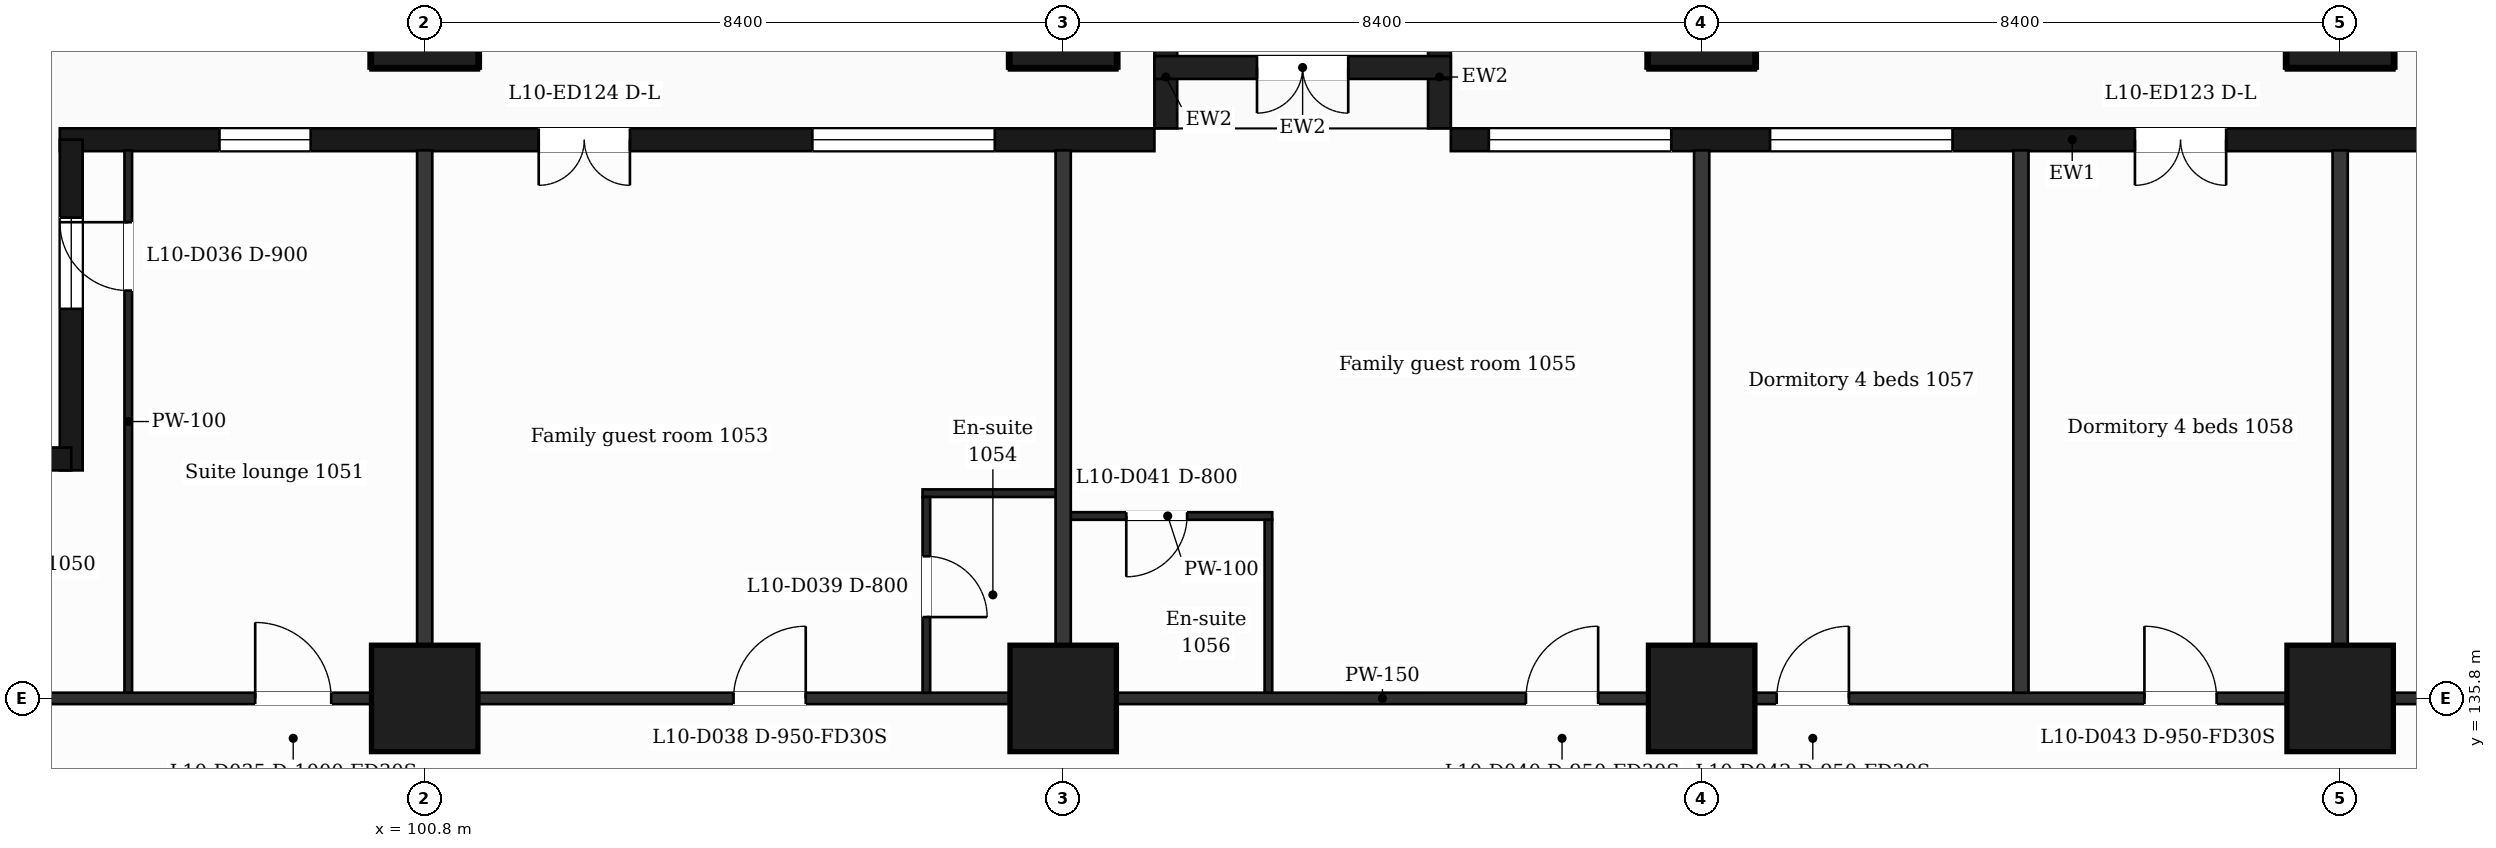
"""IFC4 building model, lengths in metres.
Left out: names, types, materials, properties, quantities, classifications, styles, units other than length and angle.
Written with IfcOpenShell. Run it as: python <this file> out.ifc"""

import sys

from ifc_helpers import new_model, si_unit, direction, frame, frame_2d, origin, origin_2d, place, context, subcontext, project, spatial, rectangle, extrude, element, fill, save


model = new_model("IFC4")
c1 = context("Model", 3, precision=1e-05, world=origin(), true_north=direction((0.0, 1.0)))
c2 = subcontext(c1, "Body", "Model", "MODEL_VIEW")
j1 = project(units=[si_unit("LENGTHUNIT", "METRE"), si_unit("PLANEANGLEUNIT", "RADIAN")], contexts=[c1])
p1 = place(None, origin())
s1 = spatial("IfcSite", under=j1, at=p1, CompositionType="ELEMENT")
p2 = place(p1, origin())
s2 = spatial("IfcBuilding", under=s1, at=p2, CompositionType="ELEMENT")
p3 = place(p2, frame((0.0, 0.0, 53.0)))
s3 = spatial("IfcBuildingStorey", under=s2, at=p3, CompositionType="ELEMENT", Elevation=53.0)
for number, where, z_axis, x_axis in (
    (1, (100.8, 135.8, 0.0), (0.0, 0.0, 1.0), (1.0, 0.0, 0.0)),
    (2, (109.2, 135.8, 0.0), (0.0, 0.0, 1.0), (1.0, 0.0, 0.0)),
    (3, (117.6, 135.8, 0.0), (0.0, 0.0, 1.0), (1.0, 0.0, 0.0)),
    (4, (126.0, 135.8, 0.0), (0.0, 0.0, 1.0), (1.0, 0.0, 0.0)),
    (5, (100.8, 144.8, 0.0), (0.0, 0.0, 1.0), (1.0, 0.0, 0.0)),
    (6, (109.2, 144.8, 0.0), (0.0, 0.0, 1.0), (1.0, 0.0, 0.0)),
    (7, (117.6, 144.8, 0.0), (0.0, 0.0, 1.0), (1.0, 0.0, 0.0)),
    (8, (126.0, 144.8, 0.0), (0.0, 0.0, 1.0), (1.0, 0.0, 0.0)),
):
    element("IfcColumn", number, at=place(p3, frame(where, z_axis=z_axis, x_axis=x_axis)), inside=s3, PredefinedType="COLUMN", context=c2, shape_type="SweptSolid", body=[
        extrude(rectangle(XDim=1.4, YDim=1.4, at=origin_2d()), origin(), (0.0, 0.0, 1.0), 3.5),
    ])
p4 = place(p3, frame((130.65, 143.15, 0.0), z_axis=(0.0, 0.0, 1.0), x_axis=(-1.0, 0.0, 0.0)))
e9 = element("IfcWall", 9, at=p4, inside=s3, PredefinedType="SOLIDWALL", context=c2, shape_type="SweptSolid", body=[
    extrude(rectangle(XDim=16.35, YDim=0.3, at=frame_2d((8.175, 0.0))), origin(), (0.0, 0.0, 1.0), 3.18),
])
p5 = place(p4, frame((1.95, 0.0, 0.9)))
e10 = element("IfcOpeningElement", 10, at=p5, cuts=e9, PredefinedType="OPENING", context=c2, shape_type="SweptSolid", body=[
    extrude(rectangle(XDim=1.2, YDim=2.1, at=frame_2d((0.6, 1.05))), frame((0.0, 0.16, 0.0), z_axis=(0.0, -1.0, 0.0), x_axis=(1.0, 0.0, 0.0)), (0.0, 0.0, 1.0), 0.32),
])
p6 = place(p4, frame((6.15, 0.0, 0.0)))
e11 = element("IfcOpeningElement", 11, at=p6, cuts=e9, PredefinedType="OPENING", context=c2, shape_type="SweptSolid", body=[
    extrude(rectangle(XDim=1.2, YDim=2.4, at=frame_2d((0.6, 1.2))), frame((0.0, 0.16, 0.0), z_axis=(0.0, -1.0, 0.0), x_axis=(1.0, 0.0, 0.0)), (0.0, 0.0, 1.0), 0.32),
])
p7 = place(p4, frame((9.75, 0.0, 0.9)))
e12 = element("IfcOpeningElement", 12, at=p7, cuts=e9, PredefinedType="OPENING", context=c2, shape_type="SweptSolid", body=[
    extrude(rectangle(XDim=2.4, YDim=2.1, at=frame_2d((1.2, 1.05))), frame((0.0, 0.16, 0.0), z_axis=(0.0, -1.0, 0.0), x_axis=(1.0, 0.0, 0.0)), (0.0, 0.0, 1.0), 0.32),
])
p8 = place(p4, frame((13.45, 0.0, 0.9)))
e13 = element("IfcOpeningElement", 13, at=p8, cuts=e9, PredefinedType="OPENING", context=c2, shape_type="SweptSolid", body=[
    extrude(rectangle(XDim=2.4, YDim=2.1, at=frame_2d((1.2, 1.05))), frame((0.0, 0.16, 0.0), z_axis=(0.0, -1.0, 0.0), x_axis=(1.0, 0.0, 0.0)), (0.0, 0.0, 1.0), 0.32),
])
p9 = place(p3, frame((110.4, 143.15, 0.0), z_axis=(0.0, 0.0, 1.0), x_axis=(-1.0, 0.0, 0.0)))
e14 = element("IfcWall", 14, at=p9, inside=s3, PredefinedType="SOLIDWALL", context=c2, shape_type="SweptSolid", body=[
    extrude(rectangle(XDim=14.4, YDim=0.3, at=frame_2d((7.2, 0.0))), origin(), (0.0, 0.0, 1.0), 3.18),
])
p10 = place(p9, frame((2.1, 0.0, 0.9)))
e15 = element("IfcOpeningElement", 15, at=p10, cuts=e14, PredefinedType="OPENING", context=c2, shape_type="SweptSolid", body=[
    extrude(rectangle(XDim=2.4, YDim=2.1, at=frame_2d((1.2, 1.05))), frame((0.0, 0.16, 0.0), z_axis=(0.0, -1.0, 0.0), x_axis=(1.0, 0.0, 0.0)), (0.0, 0.0, 1.0), 0.32),
])
p11 = place(p9, frame((6.9, 0.0, 0.0)))
e16 = element("IfcOpeningElement", 16, at=p11, cuts=e14, PredefinedType="OPENING", context=c2, shape_type="SweptSolid", body=[
    extrude(rectangle(XDim=1.2, YDim=2.4, at=frame_2d((0.6, 1.2))), frame((0.0, 0.16, 0.0), z_axis=(0.0, -1.0, 0.0), x_axis=(1.0, 0.0, 0.0)), (0.0, 0.0, 1.0), 0.32),
])
p12 = place(p9, frame((11.1, 0.0, 0.9)))
e17 = element("IfcOpeningElement", 17, at=p12, cuts=e14, PredefinedType="OPENING", context=c2, shape_type="SweptSolid", body=[
    extrude(rectangle(XDim=1.2, YDim=2.1, at=frame_2d((0.6, 1.05))), frame((0.0, 0.16, 0.0), z_axis=(0.0, -1.0, 0.0), x_axis=(1.0, 0.0, 0.0)), (0.0, 0.0, 1.0), 0.32),
])
for number, where, z_axis, x_axis in (
    (18, (114.15, 143.3, 0.0), (0.0, 0.0, 1.0), (0.0, 1.0, 0.0)),
    (19, (110.55, 143.3, 0.0), (0.0, 0.0, 1.0), (0.0, 1.0, 0.0)),
):
    element("IfcWall", number, at=place(p3, frame(where, z_axis=z_axis, x_axis=x_axis)), inside=s3, PredefinedType="SOLIDWALL", context=c2, shape_type="SweptSolid", body=[
        extrude(rectangle(XDim=1.35, YDim=0.3, at=frame_2d((0.675, 0.0))), origin(), (0.0, 0.0, 1.0), 3.18),
    ])
p13 = place(p3, frame((114.3, 144.1, 0.0), z_axis=(0.0, 0.0, 1.0), x_axis=(-1.0, 0.0, 0.0)))
e20 = element("IfcWall", 20, at=p13, inside=s3, PredefinedType="SOLIDWALL", context=c2, shape_type="SweptSolid", body=[
    extrude(rectangle(XDim=3.9, YDim=0.3, at=frame_2d((1.95, 0.0))), origin(), (0.0, 0.0, 1.0), 3.18),
])
p14 = place(p13, frame((1.35, 0.0, 0.0)))
e21 = element("IfcOpeningElement", 21, at=p14, cuts=e20, PredefinedType="OPENING", context=c2, shape_type="SweptSolid", body=[
    extrude(rectangle(XDim=1.2, YDim=2.4, at=frame_2d((0.6, 1.2))), frame((0.0, 0.16, 0.0), z_axis=(0.0, -1.0, 0.0), x_axis=(1.0, 0.0, 0.0)), (0.0, 0.0, 1.0), 0.32),
])
p15 = place(p3, frame((96.15, 143.15, 0.0), z_axis=(0.0, 0.0, 1.0), x_axis=(0.0, -1.0, 0.0)))
e22 = element("IfcWall", 22, at=p15, inside=s3, PredefinedType="SOLIDWALL", context=c2, shape_type="SweptSolid", body=[
    extrude(rectangle(XDim=4.35, YDim=0.3, at=frame_2d((2.175, 0.0))), origin(), (0.0, 0.0, 1.0), 3.18),
])
p16 = place(p15, frame((1.025, 0.0, 0.9)))
e23 = element("IfcOpeningElement", 23, at=p16, cuts=e22, PredefinedType="OPENING", context=c2, shape_type="SweptSolid", body=[
    extrude(rectangle(XDim=1.2, YDim=2.1, at=frame_2d((0.6, 1.05))), frame((0.0, 0.16, 0.0), z_axis=(0.0, -1.0, 0.0), x_axis=(1.0, 0.0, 0.0)), (0.0, 0.0, 1.0), 0.32),
])
p17 = place(p3, frame((96.15, 138.95, 0.0), z_axis=(0.0, 0.0, 1.0), x_axis=(-1.0, 0.0, 0.0)))
e24 = element("IfcWall", 24, at=p17, inside=s3, PredefinedType="SOLIDWALL", context=c2, shape_type="SweptSolid", body=[
    extrude(rectangle(XDim=5.104, YDim=0.3, at=frame_2d((2.552, 0.0))), origin(), (0.0, 0.0, 1.0), 3.18),
])
p18 = place(p17, frame((0.725, 0.0, 0.9)))
e25 = element("IfcOpeningElement", 25, at=p18, cuts=e24, PredefinedType="OPENING", context=c2, shape_type="SweptSolid", body=[
    extrude(rectangle(XDim=2.4, YDim=2.1, at=frame_2d((1.2, 1.05))), frame((0.0, 0.16, 0.0), z_axis=(0.0, -1.0, 0.0), x_axis=(1.0, 0.0, 0.0)), (0.0, 0.0, 1.0), 0.32),
])
p19 = place(p3, frame((90.895, 135.8, 0.0), z_axis=(0.0, 0.0, 1.0), x_axis=(1.0, 0.0, 0.0)))
e26 = element("IfcWall", 26, at=p19, inside=s3, PredefinedType="PARTITIONING", context=c2, shape_type="SweptSolid", body=[
    extrude(rectangle(XDim=45.011, YDim=0.15, at=frame_2d((22.505, 0.0))), origin(), (0.0, 0.0, 1.0), 3.18),
])
p20 = place(p19, frame((7.675, 0.0, 0.0)))
e27 = element("IfcOpeningElement", 27, at=p20, cuts=e26, PredefinedType="OPENING", context=c2, shape_type="SweptSolid", body=[
    extrude(rectangle(XDim=1.0, YDim=2.1, at=frame_2d((0.5, 1.05))), frame((0.0, 0.085, 0.0), z_axis=(0.0, -1.0, 0.0), x_axis=(1.0, 0.0, 0.0)), (0.0, 0.0, 1.0), 0.17),
])
p21 = place(p19, frame((13.969, 0.0, 0.0)))
e28 = element("IfcOpeningElement", 28, at=p21, cuts=e26, PredefinedType="OPENING", context=c2, shape_type="SweptSolid", body=[
    extrude(rectangle(XDim=0.95, YDim=2.1, at=frame_2d((0.475, 1.05))), frame((0.0, 0.085, 0.0), z_axis=(0.0, -1.0, 0.0), x_axis=(1.0, 0.0, 0.0)), (0.0, 0.0, 1.0), 0.17),
])
p22 = place(p19, frame((24.393, 0.0, 0.0)))
e29 = element("IfcOpeningElement", 29, at=p22, cuts=e26, PredefinedType="OPENING", context=c2, shape_type="SweptSolid", body=[
    extrude(rectangle(XDim=0.95, YDim=2.1, at=frame_2d((0.475, 1.05))), frame((0.0, 0.085, 0.0), z_axis=(0.0, -1.0, 0.0), x_axis=(1.0, 0.0, 0.0)), (0.0, 0.0, 1.0), 0.17),
])
p23 = place(p19, frame((27.692, 0.0, 0.0)))
e30 = element("IfcOpeningElement", 30, at=p23, cuts=e26, PredefinedType="OPENING", context=c2, shape_type="SweptSolid", body=[
    extrude(rectangle(XDim=0.95, YDim=2.1, at=frame_2d((0.475, 1.05))), frame((0.0, 0.085, 0.0), z_axis=(0.0, -1.0, 0.0), x_axis=(1.0, 0.0, 0.0)), (0.0, 0.0, 1.0), 0.17),
])
p24 = place(p19, frame((32.531, 0.0, 0.0)))
e31 = element("IfcOpeningElement", 31, at=p24, cuts=e26, PredefinedType="OPENING", context=c2, shape_type="SweptSolid", body=[
    extrude(rectangle(XDim=0.95, YDim=2.1, at=frame_2d((0.475, 1.05))), frame((0.0, 0.085, 0.0), z_axis=(0.0, -1.0, 0.0), x_axis=(1.0, 0.0, 0.0)), (0.0, 0.0, 1.0), 0.17),
])
p25 = place(p19, frame((39.814, 0.0, 0.0)))
e32 = element("IfcOpeningElement", 32, at=p25, cuts=e26, PredefinedType="OPENING", context=c2, shape_type="SweptSolid", body=[
    extrude(rectangle(XDim=0.95, YDim=2.1, at=frame_2d((0.475, 1.05))), frame((0.0, 0.085, 0.0), z_axis=(0.0, -1.0, 0.0), x_axis=(1.0, 0.0, 0.0)), (0.0, 0.0, 1.0), 0.17),
])
p26 = place(p3, frame((109.2, 138.2, 0.0), z_axis=(0.0, 0.0, 1.0), x_axis=(1.0, 0.0, 0.0)))
e33 = element("IfcWall", 33, at=p26, inside=s3, PredefinedType="PARTITIONING", context=c2, shape_type="SweptSolid", body=[
    extrude(rectangle(XDim=2.75, YDim=0.1, at=frame_2d((1.375, 0.0))), origin(), (0.0, 0.0, 1.0), 3.18),
])
p27 = place(p26, frame((0.83, 0.0, 0.0)))
e34 = element("IfcOpeningElement", 34, at=p27, cuts=e33, PredefinedType="OPENING", context=c2, shape_type="SweptSolid", body=[
    extrude(rectangle(XDim=0.8, YDim=2.1, at=frame_2d((0.4, 1.05))), frame((0.0, 0.06, 0.0), z_axis=(0.0, -1.0, 0.0), x_axis=(1.0, 0.0, 0.0)), (0.0, 0.0, 1.0), 0.12),
])
p28 = place(p3, frame((107.35, 138.5, 0.0), z_axis=(0.0, 0.0, 1.0), x_axis=(1.0, 0.0, 0.0)))
e35 = element("IfcWall", 35, at=p28, inside=s3, PredefinedType="PARTITIONING", context=c2, shape_type="SweptSolid", body=[
    extrude(rectangle(XDim=1.85, YDim=0.1, at=frame_2d((0.925, 0.0))), origin(), (0.0, 0.0, 1.0), 3.18),
])
p29 = place(p3, frame((96.9, 135.875, 0.0), z_axis=(0.0, 0.0, 1.0), x_axis=(0.0, 1.0, 0.0)))
e36 = element("IfcWall", 36, at=p29, inside=s3, PredefinedType="PARTITIONING", context=c2, shape_type="SweptSolid", body=[
    extrude(rectangle(XDim=7.135, YDim=0.1, at=frame_2d((3.567, 0.0))), origin(), (0.0, 0.0, 1.0), 3.18),
])
p30 = place(p29, frame((5.29, 0.0, 0.0)))
e37 = element("IfcOpeningElement", 37, at=p30, cuts=e36, PredefinedType="OPENING", context=c2, shape_type="SweptSolid", body=[
    extrude(rectangle(XDim=0.9, YDim=2.1, at=frame_2d((0.45, 1.05))), frame((0.0, 0.06, 0.0), z_axis=(0.0, -1.0, 0.0), x_axis=(1.0, 0.0, 0.0)), (0.0, 0.0, 1.0), 0.12),
])
p31 = place(p3, frame((100.8, 135.875, 0.0), z_axis=(0.0, 0.0, 1.0), x_axis=(0.0, 1.0, 0.0)))
e38 = element("IfcWall", 38, at=p31, inside=s3, PredefinedType="PARTITIONING", context=c2, shape_type="SweptSolid", body=[
    extrude(rectangle(XDim=7.135, YDim=0.2, at=frame_2d((3.567, 0.0))), origin(), (0.0, 0.0, 1.0), 3.18),
])
p32 = place(p3, frame((107.4, 135.875, 0.0), z_axis=(0.0, 0.0, 1.0), x_axis=(0.0, 1.0, 0.0)))
e39 = element("IfcWall", 39, at=p32, inside=s3, PredefinedType="PARTITIONING", context=c2, shape_type="SweptSolid", body=[
    extrude(rectangle(XDim=2.575, YDim=0.1, at=frame_2d((1.288, 0.0))), origin(), (0.0, 0.0, 1.0), 3.18),
])
p33 = place(p32, frame((0.995, 0.0, 0.0)))
e40 = element("IfcOpeningElement", 40, at=p33, cuts=e39, PredefinedType="OPENING", context=c2, shape_type="SweptSolid", body=[
    extrude(rectangle(XDim=0.8, YDim=2.1, at=frame_2d((0.4, 1.05))), frame((0.0, 0.06, 0.0), z_axis=(0.0, -1.0, 0.0), x_axis=(1.0, 0.0, 0.0)), (0.0, 0.0, 1.0), 0.12),
])
p34 = place(p3, frame((109.2, 135.875, 0.0), z_axis=(0.0, 0.0, 1.0), x_axis=(0.0, 1.0, 0.0)))
e41 = element("IfcWall", 41, at=p34, inside=s3, PredefinedType="PARTITIONING", context=c2, shape_type="SweptSolid", body=[
    extrude(rectangle(XDim=7.135, YDim=0.2, at=frame_2d((3.567, 0.0))), origin(), (0.0, 0.0, 1.0), 3.18),
])
p35 = place(p3, frame((111.9, 135.875, 0.0), z_axis=(0.0, 0.0, 1.0), x_axis=(0.0, 1.0, 0.0)))
e42 = element("IfcWall", 42, at=p35, inside=s3, PredefinedType="PARTITIONING", context=c2, shape_type="SweptSolid", body=[
    extrude(rectangle(XDim=2.275, YDim=0.1, at=frame_2d((1.137, 0.0))), origin(), (0.0, 0.0, 1.0), 3.18),
])
for number, where, z_axis, x_axis in (
    (43, (117.6, 135.875, 0.0), (0.0, 0.0, 1.0), (0.0, 1.0, 0.0)),
    (44, (121.8, 135.875, 0.0), (0.0, 0.0, 1.0), (0.0, 1.0, 0.0)),
    (45, (126.0, 135.875, 0.0), (0.0, 0.0, 1.0), (0.0, 1.0, 0.0)),
):
    element("IfcWall", number, at=place(p3, frame(where, z_axis=z_axis, x_axis=x_axis)), inside=s3, PredefinedType="PARTITIONING", context=c2, shape_type="SweptSolid", body=[
        extrude(rectangle(XDim=7.135, YDim=0.2, at=frame_2d((3.567, 0.0))), origin(), (0.0, 0.0, 1.0), 3.18),
    ])
p36 = place(p6, origin())
e46 = element("IfcDoor", 46, at=p36, inside=s3, OperationType="DOUBLE_DOOR_SINGLE_SWING", PredefinedType="DOOR", context=c2, shape_type="SweptSolid", body=[
    extrude(rectangle(XDim=1.2, YDim=2.4, at=frame_2d((0.6, 1.2))), frame((0.0, 0.025, 0.0), z_axis=(0.0, -1.0, 0.0), x_axis=(1.0, 0.0, 0.0)), (0.0, 0.0, 1.0), 0.05),
])
fill(e11, e46)
p37 = place(p7, origin())
e47 = element("IfcWindow", 47, at=p37, inside=s3, PartitioningType="SINGLE_PANEL", PredefinedType="WINDOW", context=c2, shape_type="SweptSolid", body=[
    extrude(rectangle(XDim=2.4, YDim=2.1, at=frame_2d((1.2, 1.05))), frame((0.0, 0.03, 0.0), z_axis=(0.0, -1.0, 0.0), x_axis=(1.0, 0.0, 0.0)), (0.0, 0.0, 1.0), 0.06),
])
fill(e12, e47)
p38 = place(p8, origin())
e48 = element("IfcWindow", 48, at=p38, inside=s3, PartitioningType="SINGLE_PANEL", PredefinedType="WINDOW", context=c2, shape_type="SweptSolid", body=[
    extrude(rectangle(XDim=2.4, YDim=2.1, at=frame_2d((1.2, 1.05))), frame((0.0, 0.03, 0.0), z_axis=(0.0, -1.0, 0.0), x_axis=(1.0, 0.0, 0.0)), (0.0, 0.0, 1.0), 0.06),
])
fill(e13, e48)
p39 = place(p10, origin())
e49 = element("IfcWindow", 49, at=p39, inside=s3, PartitioningType="SINGLE_PANEL", PredefinedType="WINDOW", context=c2, shape_type="SweptSolid", body=[
    extrude(rectangle(XDim=2.4, YDim=2.1, at=frame_2d((1.2, 1.05))), frame((0.0, 0.03, 0.0), z_axis=(0.0, -1.0, 0.0), x_axis=(1.0, 0.0, 0.0)), (0.0, 0.0, 1.0), 0.06),
])
fill(e15, e49)
p40 = place(p11, origin())
e50 = element("IfcDoor", 50, at=p40, inside=s3, OperationType="DOUBLE_DOOR_SINGLE_SWING", PredefinedType="DOOR", context=c2, shape_type="SweptSolid", body=[
    extrude(rectangle(XDim=1.2, YDim=2.4, at=frame_2d((0.6, 1.2))), frame((0.0, 0.025, 0.0), z_axis=(0.0, -1.0, 0.0), x_axis=(1.0, 0.0, 0.0)), (0.0, 0.0, 1.0), 0.05),
])
fill(e16, e50)
p41 = place(p12, origin())
e51 = element("IfcWindow", 51, at=p41, inside=s3, PartitioningType="SINGLE_PANEL", PredefinedType="WINDOW", context=c2, shape_type="SweptSolid", body=[
    extrude(rectangle(XDim=1.2, YDim=2.1, at=frame_2d((0.6, 1.05))), frame((0.0, 0.03, 0.0), z_axis=(0.0, -1.0, 0.0), x_axis=(1.0, 0.0, 0.0)), (0.0, 0.0, 1.0), 0.06),
])
fill(e17, e51)
p42 = place(p14, origin())
e52 = element("IfcDoor", 52, at=p42, inside=s3, OperationType="DOUBLE_DOOR_SINGLE_SWING", PredefinedType="DOOR", context=c2, shape_type="SweptSolid", body=[
    extrude(rectangle(XDim=1.2, YDim=2.4, at=frame_2d((0.6, 1.2))), frame((0.0, 0.025, 0.0), z_axis=(0.0, -1.0, 0.0), x_axis=(1.0, 0.0, 0.0)), (0.0, 0.0, 1.0), 0.05),
])
fill(e21, e52)
p43 = place(p16, origin())
e53 = element("IfcWindow", 53, at=p43, inside=s3, PartitioningType="SINGLE_PANEL", PredefinedType="WINDOW", context=c2, shape_type="SweptSolid", body=[
    extrude(rectangle(XDim=1.2, YDim=2.1, at=frame_2d((0.6, 1.05))), frame((0.0, 0.03, 0.0), z_axis=(0.0, -1.0, 0.0), x_axis=(1.0, 0.0, 0.0)), (0.0, 0.0, 1.0), 0.06),
])
fill(e23, e53)
p44 = place(p20, origin())
e54 = element("IfcDoor", 54, at=p44, inside=s3, OperationType="SINGLE_SWING_LEFT", PredefinedType="DOOR", context=c2, shape_type="SweptSolid", body=[
    extrude(rectangle(XDim=1.0, YDim=2.1, at=frame_2d((0.5, 1.05))), frame((0.0, 0.025, 0.0), z_axis=(0.0, -1.0, 0.0), x_axis=(1.0, 0.0, 0.0)), (0.0, 0.0, 1.0), 0.05),
])
fill(e27, e54)
p45 = place(p30, origin())
e55 = element("IfcDoor", 55, at=p45, inside=s3, OperationType="SINGLE_SWING_RIGHT", PredefinedType="DOOR", context=c2, shape_type="SweptSolid", body=[
    extrude(rectangle(XDim=0.9, YDim=2.1, at=frame_2d((0.45, 1.05))), frame((0.0, 0.025, 0.0), z_axis=(0.0, -1.0, 0.0), x_axis=(1.0, 0.0, 0.0)), (0.0, 0.0, 1.0), 0.05),
])
fill(e37, e55)
p46 = place(p21, origin())
e56 = element("IfcDoor", 56, at=p46, inside=s3, OperationType="SINGLE_SWING_RIGHT", PredefinedType="DOOR", context=c2, shape_type="SweptSolid", body=[
    extrude(rectangle(XDim=0.95, YDim=2.1, at=frame_2d((0.475, 1.05))), frame((0.0, 0.025, 0.0), z_axis=(0.0, -1.0, 0.0), x_axis=(1.0, 0.0, 0.0)), (0.0, 0.0, 1.0), 0.05),
])
fill(e28, e56)
p47 = place(p33, origin())
e57 = element("IfcDoor", 57, at=p47, inside=s3, OperationType="SINGLE_SWING_LEFT", PredefinedType="DOOR", context=c2, shape_type="SweptSolid", body=[
    extrude(rectangle(XDim=0.8, YDim=2.1, at=frame_2d((0.4, 1.05))), frame((0.0, 0.025, 0.0), z_axis=(0.0, -1.0, 0.0), x_axis=(1.0, 0.0, 0.0)), (0.0, 0.0, 1.0), 0.05),
])
fill(e40, e57)
p48 = place(p22, origin())
e58 = element("IfcDoor", 58, at=p48, inside=s3, OperationType="SINGLE_SWING_RIGHT", PredefinedType="DOOR", context=c2, shape_type="SweptSolid", body=[
    extrude(rectangle(XDim=0.95, YDim=2.1, at=frame_2d((0.475, 1.05))), frame((0.0, 0.025, 0.0), z_axis=(0.0, -1.0, 0.0), x_axis=(1.0, 0.0, 0.0)), (0.0, 0.0, 1.0), 0.05),
])
fill(e29, e58)
p49 = place(p27, origin())
e59 = element("IfcDoor", 59, at=p49, inside=s3, OperationType="SINGLE_SWING_LEFT", PredefinedType="DOOR", context=c2, shape_type="SweptSolid", body=[
    extrude(rectangle(XDim=0.8, YDim=2.1, at=frame_2d((0.4, 1.05))), frame((0.0, 0.025, 0.0), z_axis=(0.0, -1.0, 0.0), x_axis=(1.0, 0.0, 0.0)), (0.0, 0.0, 1.0), 0.05),
])
fill(e34, e59)
p50 = place(p23, origin())
e60 = element("IfcDoor", 60, at=p50, inside=s3, OperationType="SINGLE_SWING_RIGHT", PredefinedType="DOOR", context=c2, shape_type="SweptSolid", body=[
    extrude(rectangle(XDim=0.95, YDim=2.1, at=frame_2d((0.475, 1.05))), frame((0.0, 0.025, 0.0), z_axis=(0.0, -1.0, 0.0), x_axis=(1.0, 0.0, 0.0)), (0.0, 0.0, 1.0), 0.05),
])
fill(e30, e60)
p51 = place(p24, origin())
e61 = element("IfcDoor", 61, at=p51, inside=s3, OperationType="SINGLE_SWING_LEFT", PredefinedType="DOOR", context=c2, shape_type="SweptSolid", body=[
    extrude(rectangle(XDim=0.95, YDim=2.1, at=frame_2d((0.475, 1.05))), frame((0.0, 0.025, 0.0), z_axis=(0.0, -1.0, 0.0), x_axis=(1.0, 0.0, 0.0)), (0.0, 0.0, 1.0), 0.05),
])
fill(e31, e61)
save(model, sys.argv[1])
